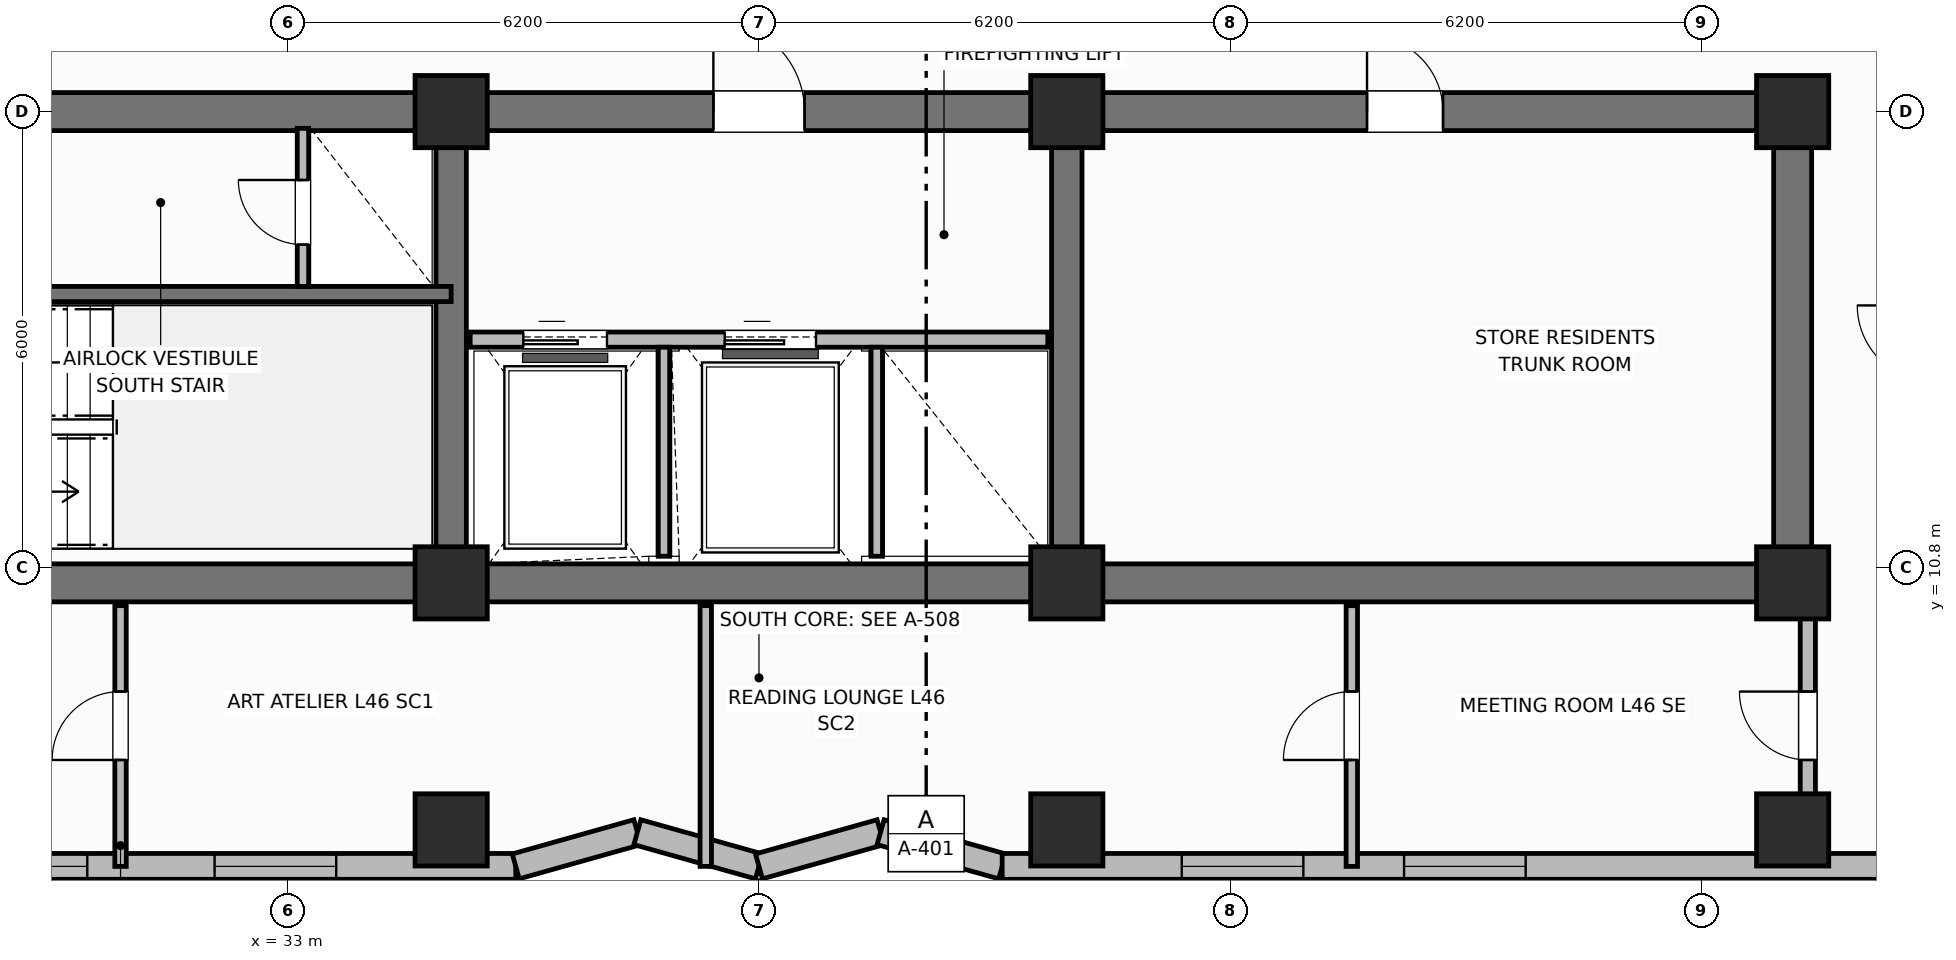
"""IFC4 building model, lengths in metres.
Left out: names, types, materials, properties, quantities, classifications, styles, units other than length and angle.
Written with IfcOpenShell. Run it as: python <this file> out.ifc"""

import sys

from ifc_helpers import new_model, si_unit, direction, frame, frame_2d, origin, origin_2d, place, context, subcontext, project, spatial, rectangle, extrude, element, fill, save


model = new_model("IFC4")
c1 = context("Model", 3, precision=1e-05, world=origin(), true_north=direction((0.0, 1.0)))
c2 = subcontext(c1, "Body", "Model", "MODEL_VIEW")
j1 = project(units=[si_unit("LENGTHUNIT", "METRE"), si_unit("PLANEANGLEUNIT", "RADIAN")], contexts=[c1])
p1 = place(None, origin())
s1 = spatial("IfcSite", under=j1, at=p1, CompositionType="ELEMENT")
p2 = place(p1, origin())
s2 = spatial("IfcBuilding", under=s1, at=p2, CompositionType="ELEMENT")
p3 = place(p2, frame((0.0, 0.0, 184.8)))
s3 = spatial("IfcBuildingStorey", under=s2, at=p3, CompositionType="ELEMENT", Elevation=184.8)
p4 = place(p3, frame((52.8, 10.6, 0.0), z_axis=(0.0, 0.0, 1.0), x_axis=(-1.0, 0.0, 0.0)))
e1 = element("IfcWall", 1, at=p4, inside=s3, PredefinedType="SHEAR", context=c2, shape_type="SweptSolid", body=[
    extrude(rectangle(XDim=27.2, YDim=0.5, at=frame_2d((13.6, 0.0))), origin(), (0.0, 0.0, 1.0), 3.7),
])
p5 = place(p3, frame((52.8, 10.85, 0.0), z_axis=(0.0, 0.0, 1.0), x_axis=(0.0, 1.0, 0.0)))
e2 = element("IfcWall", 2, at=p5, inside=s3, PredefinedType="SHEAR", context=c2, shape_type="SweptSolid", body=[
    extrude(rectangle(XDim=5.7, YDim=0.5, at=frame_2d((2.85, 0.0))), origin(), (0.0, 0.0, 1.0), 3.7),
])
p6 = place(p3, frame((25.6, 16.8, 0.0), z_axis=(0.0, 0.0, 1.0), x_axis=(1.0, 0.0, 0.0)))
e3 = element("IfcWall", 3, at=p6, inside=s3, PredefinedType="SHEAR", context=c2, shape_type="SweptSolid", body=[
    extrude(rectangle(XDim=27.2, YDim=0.5, at=frame_2d((13.6, 0.0))), origin(), (0.0, 0.0, 1.0), 3.7),
])
p7 = place(p6, frame((1.9, 0.0, 0.0)))
e4 = element("IfcOpeningElement", 4, at=p7, cuts=e3, PredefinedType="OPENING", context=c2, shape_type="SweptSolid", body=[
    extrude(rectangle(XDim=1.1, YDim=2.15, at=frame_2d((0.55, 1.075))), frame((0.0, 0.26, 0.0), z_axis=(0.0, -1.0, 0.0), x_axis=(1.0, 0.0, 0.0)), (0.0, 0.0, 1.0), 0.52),
])
p8 = place(p6, frame((13.0, 0.0, 0.0)))
e5 = element("IfcOpeningElement", 5, at=p8, cuts=e3, PredefinedType="OPENING", context=c2, shape_type="SweptSolid", body=[
    extrude(rectangle(XDim=1.2, YDim=2.15, at=frame_2d((0.6, 1.075))), frame((0.0, 0.26, 0.0), z_axis=(0.0, -1.0, 0.0), x_axis=(1.0, 0.0, 0.0)), (0.0, 0.0, 1.0), 0.52),
])
p9 = place(p6, frame((21.6, 0.0, 0.0)))
e6 = element("IfcOpeningElement", 6, at=p9, cuts=e3, PredefinedType="OPENING", context=c2, shape_type="SweptSolid", body=[
    extrude(rectangle(XDim=1.0, YDim=2.15, at=frame_2d((0.5, 1.075))), frame((0.0, 0.26, 0.0), z_axis=(0.0, -1.0, 0.0), x_axis=(1.0, 0.0, 0.0)), (0.0, 0.0, 1.0), 0.52),
])
for number, where, z_axis, x_axis in (
    (7, (35.15, 10.85, 0.0), (0.0, 0.0, 1.0), (0.0, 1.0, 0.0)),
    (8, (43.25, 10.85, 0.0), (0.0, 0.0, 1.0), (0.0, 1.0, 0.0)),
):
    element("IfcWall", number, at=place(p3, frame(where, z_axis=z_axis, x_axis=x_axis)), inside=s3, PredefinedType="SHEAR", context=c2, shape_type="SweptSolid", body=[
        extrude(rectangle(XDim=5.7, YDim=0.4, at=frame_2d((2.85, 0.0))), origin(), (0.0, 0.0, 1.0), 3.7),
    ])
for number, where, z_axis, x_axis in (
    (9, (35.15, 10.6, 0.0), (0.0, 0.0, 1.0), (1.0, 0.0, 0.0)),
    (10, (35.15, 16.8, 0.0), (0.0, 0.0, 1.0), (1.0, 0.0, 0.0)),
    (11, (43.25, 10.6, 0.0), (0.0, 0.0, 1.0), (1.0, 0.0, 0.0)),
    (12, (43.25, 16.8, 0.0), (0.0, 0.0, 1.0), (1.0, 0.0, 0.0)),
    (13, (52.8, 10.6, 0.0), (0.0, 0.0, 1.0), (1.0, 0.0, 0.0)),
    (14, (52.8, 16.8, 0.0), (0.0, 0.0, 1.0), (1.0, 0.0, 0.0)),
    (15, (35.15, 7.35, 0.0), (0.0, 0.0, 1.0), (1.0, 0.0, 0.0)),
    (16, (43.25, 7.35, 0.0), (0.0, 0.0, 1.0), (1.0, 0.0, 0.0)),
    (17, (52.8, 7.35, 0.0), (0.0, 0.0, 1.0), (1.0, 0.0, 0.0)),
):
    element("IfcColumn", number, at=place(p3, frame(where, z_axis=z_axis, x_axis=x_axis)), inside=s3, PredefinedType="COLUMN", context=c2, shape_type="SweptSolid", body=[
        extrude(rectangle(XDim=0.95, YDim=0.95, at=origin_2d()), origin(), (0.0, 0.0, 1.0), 3.7),
    ])
p10 = place(p3, frame((20.2, 6.87, 0.0), z_axis=(0.0, 0.0, 1.0), x_axis=(1.0, 0.0, 0.0)))
e18 = element("IfcWall", 18, at=p10, inside=s3, PredefinedType="SOLIDWALL", context=c2, shape_type="SweptSolid", body=[
    extrude(rectangle(XDim=15.8, YDim=0.34, at=frame_2d((7.9, 0.0))), origin(), (0.0, 0.0, 1.0), 2.72),
])
p11 = place(p10, frame((8.562, 0.0, 0.7)))
e19 = element("IfcOpeningElement", 19, at=p11, cuts=e18, PredefinedType="OPENING", context=c2, shape_type="SweptSolid", body=[
    extrude(rectangle(XDim=1.6, YDim=1.9, at=frame_2d((0.8, 0.95))), frame((0.0, 0.18, 0.0), z_axis=(0.0, -1.0, 0.0), x_axis=(1.0, 0.0, 0.0)), (0.0, 0.0, 1.0), 0.36),
])
p12 = place(p10, frame((11.837, 0.0, 0.7)))
e20 = element("IfcOpeningElement", 20, at=p12, cuts=e18, PredefinedType="OPENING", context=c2, shape_type="SweptSolid", body=[
    extrude(rectangle(XDim=1.6, YDim=1.9, at=frame_2d((0.8, 0.95))), frame((0.0, 0.18, 0.0), z_axis=(0.0, -1.0, 0.0), x_axis=(1.0, 0.0, 0.0)), (0.0, 0.0, 1.0), 0.36),
])
p13 = place(p3, frame((36.0, 6.87, 0.0), z_axis=(0.0, 0.0, 1.0), x_axis=(0.962662902433, 0.270703040766, 0.0)))
e21 = element("IfcWall", 21, at=p13, inside=s3, PredefinedType="SOLIDWALL", context=c2, shape_type="SweptSolid", body=[
    extrude(rectangle(XDim=1.662, YDim=0.34, at=frame_2d((0.831, 0.0))), origin(), (0.0, 0.0, 1.0), 2.72),
])
p14 = place(p3, frame((37.6, 7.32, 0.0), z_axis=(0.0, 0.0, 1.0), x_axis=(0.962652136636, -0.270741322725, 0.0)))
e22 = element("IfcWall", 22, at=p14, inside=s3, PredefinedType="SOLIDWALL", context=c2, shape_type="SweptSolid", body=[
    extrude(rectangle(XDim=1.662, YDim=0.34, at=frame_2d((0.831, 0.0))), origin(), (0.0, 0.0, 1.0), 2.72),
])
p15 = place(p3, frame((39.2, 6.87, 0.0), z_axis=(0.0, 0.0, 1.0), x_axis=(0.962662902433, 0.270703040766, 0.0)))
e23 = element("IfcWall", 23, at=p15, inside=s3, PredefinedType="SOLIDWALL", context=c2, shape_type="SweptSolid", body=[
    extrude(rectangle(XDim=1.662, YDim=0.34, at=frame_2d((0.831, 0.0))), origin(), (0.0, 0.0, 1.0), 2.72),
])
p16 = place(p3, frame((40.8, 7.32, 0.0), z_axis=(0.0, 0.0, 1.0), x_axis=(0.962652136636, -0.270741322725, 0.0)))
e24 = element("IfcWall", 24, at=p16, inside=s3, PredefinedType="SOLIDWALL", context=c2, shape_type="SweptSolid", body=[
    extrude(rectangle(XDim=1.662, YDim=0.34, at=frame_2d((0.831, 0.0))), origin(), (0.0, 0.0, 1.0), 2.72),
])
p17 = place(p3, frame((42.4, 6.87, 0.0), z_axis=(0.0, 0.0, 1.0), x_axis=(1.0, 0.0, 0.0)))
e25 = element("IfcWall", 25, at=p17, inside=s3, PredefinedType="SOLIDWALL", context=c2, shape_type="SweptSolid", body=[
    extrude(rectangle(XDim=15.8, YDim=0.34, at=frame_2d((7.9, 0.0))), origin(), (0.0, 0.0, 1.0), 2.72),
])
p18 = place(p17, frame((2.363, 0.0, 0.7)))
e26 = element("IfcOpeningElement", 26, at=p18, cuts=e25, PredefinedType="OPENING", context=c2, shape_type="SweptSolid", body=[
    extrude(rectangle(XDim=1.6, YDim=1.9, at=frame_2d((0.8, 0.95))), frame((0.0, 0.18, 0.0), z_axis=(0.0, -1.0, 0.0), x_axis=(1.0, 0.0, 0.0)), (0.0, 0.0, 1.0), 0.36),
])
p19 = place(p17, frame((5.288, 0.0, 0.7)))
e27 = element("IfcOpeningElement", 27, at=p19, cuts=e25, PredefinedType="OPENING", context=c2, shape_type="SweptSolid", body=[
    extrude(rectangle(XDim=1.6, YDim=1.9, at=frame_2d((0.8, 0.95))), frame((0.0, 0.18, 0.0), z_axis=(0.0, -1.0, 0.0), x_axis=(1.0, 0.0, 0.0)), (0.0, 0.0, 1.0), 0.36),
])
p20 = place(p17, frame((12.887, 0.0, 0.7)))
e28 = element("IfcOpeningElement", 28, at=p20, cuts=e25, PredefinedType="OPENING", context=c2, shape_type="SweptSolid", body=[
    extrude(rectangle(XDim=1.6, YDim=1.9, at=frame_2d((0.8, 0.95))), frame((0.0, 0.18, 0.0), z_axis=(0.0, -1.0, 0.0), x_axis=(1.0, 0.0, 0.0)), (0.0, 0.0, 1.0), 0.36),
])
p21 = place(p3, frame((25.6, 14.4, 0.0), z_axis=(0.0, 0.0, 1.0), x_axis=(1.0, 0.0, 0.0)))
e29 = element("IfcWall", 29, at=p21, inside=s3, PredefinedType="SHEAR", context=c2, shape_type="SweptSolid", body=[
    extrude(rectangle(XDim=9.55, YDim=0.2, at=frame_2d((4.775, 0.0))), origin(), (0.0, 0.0, 1.0), 3.7),
])
p22 = place(p21, frame((1.05, 0.0, 0.0)))
e30 = element("IfcOpeningElement", 30, at=p22, cuts=e29, PredefinedType="OPENING", context=c2, shape_type="SweptSolid", body=[
    extrude(rectangle(XDim=1.1, YDim=2.15, at=frame_2d((0.55, 1.075))), frame((0.0, 0.11, 0.0), z_axis=(0.0, -1.0, 0.0), x_axis=(1.0, 0.0, 0.0)), (0.0, 0.0, 1.0), 0.22),
])
p23 = place(p3, frame((33.2, 14.5, 0.0), z_axis=(0.0, 0.0, 1.0), x_axis=(0.0, 1.0, 0.0)))
e31 = element("IfcWall", 31, at=p23, inside=s3, PredefinedType="PARTITIONING", context=c2, shape_type="SweptSolid", body=[
    extrude(rectangle(XDim=2.08, YDim=0.15, at=frame_2d((1.04, 0.0))), origin(), (0.0, 0.0, 1.0), 2.55),
])
p24 = place(p23, frame((0.55, 0.0, 0.0)))
e32 = element("IfcOpeningElement", 32, at=p24, cuts=e31, PredefinedType="OPENING", context=c2, shape_type="SweptSolid", body=[
    extrude(rectangle(XDim=0.85, YDim=2.05, at=frame_2d((0.425, 1.025))), frame((0.0, 0.085, 0.0), z_axis=(0.0, -1.0, 0.0), x_axis=(1.0, 0.0, 0.0)), (0.0, 0.0, 1.0), 0.17),
])
p25 = place(p3, frame((35.4, 13.8, 0.0), z_axis=(0.0, 0.0, 1.0), x_axis=(1.0, 0.0, 0.0)))
e33 = element("IfcWall", 33, at=p25, inside=s3, PredefinedType="PARTITIONING", context=c2, shape_type="SweptSolid", body=[
    extrude(rectangle(XDim=7.6, YDim=0.2, at=frame_2d((3.8, 0.0))), origin(), (0.0, 0.0, 1.0), 2.32),
])
p26 = place(p25, frame((0.7, 0.0, 0.0)))
e34 = element("IfcOpeningElement", 34, at=p26, cuts=e33, PredefinedType="OPENING", context=c2, shape_type="SweptSolid", body=[
    extrude(rectangle(XDim=1.1, YDim=2.15, at=frame_2d((0.55, 1.075))), frame((0.0, 0.11, 0.0), z_axis=(0.0, -1.0, 0.0), x_axis=(1.0, 0.0, 0.0)), (0.0, 0.0, 1.0), 0.22),
])
p27 = place(p25, frame((3.35, 0.0, 0.0)))
e35 = element("IfcOpeningElement", 35, at=p27, cuts=e33, PredefinedType="OPENING", context=c2, shape_type="SweptSolid", body=[
    extrude(rectangle(XDim=1.2, YDim=2.15, at=frame_2d((0.6, 1.075))), frame((0.0, 0.11, 0.0), z_axis=(0.0, -1.0, 0.0), x_axis=(1.0, 0.0, 0.0)), (0.0, 0.0, 1.0), 0.22),
])
for number, where, z_axis, x_axis in (
    (36, (37.95, 10.95, 0.0), (0.0, 0.0, 1.0), (0.0, 1.0, 0.0)),
    (37, (40.75, 10.95, 0.0), (0.0, 0.0, 1.0), (0.0, 1.0, 0.0)),
):
    element("IfcWall", number, at=place(p3, frame(where, z_axis=z_axis, x_axis=x_axis)), inside=s3, PredefinedType="PARTITIONING", context=c2, shape_type="SweptSolid", body=[
        extrude(rectangle(XDim=2.75, YDim=0.15, at=frame_2d((1.375, 0.0))), origin(), (0.0, 0.0, 1.0), 2.55),
    ])
p28 = place(p3, frame((30.8, 6.87, 0.0), z_axis=(0.0, 0.0, 1.0), x_axis=(0.0, 1.0, 0.0)))
e38 = element("IfcWall", 38, at=p28, inside=s3, PredefinedType="PARTITIONING", context=c2, shape_type="SweptSolid", body=[
    extrude(rectangle(XDim=3.43, YDim=0.15, at=frame_2d((1.715, 0.0))), origin(), (0.0, 0.0, 1.0), 2.55),
])
p29 = place(p28, frame((1.4, 0.0, 0.0)))
e39 = element("IfcOpeningElement", 39, at=p29, cuts=e38, PredefinedType="OPENING", context=c2, shape_type="SweptSolid", body=[
    extrude(rectangle(XDim=0.9, YDim=2.1, at=frame_2d((0.45, 1.05))), frame((0.0, 0.085, 0.0), z_axis=(0.0, -1.0, 0.0), x_axis=(1.0, 0.0, 0.0)), (0.0, 0.0, 1.0), 0.17),
])
p30 = place(p3, frame((38.5, 6.87, 0.0), z_axis=(0.0, 0.0, 1.0), x_axis=(0.0, 1.0, 0.0)))
e40 = element("IfcWall", 40, at=p30, inside=s3, PredefinedType="PARTITIONING", context=c2, shape_type="SweptSolid", body=[
    extrude(rectangle(XDim=3.43, YDim=0.15, at=frame_2d((1.715, 0.0))), origin(), (0.0, 0.0, 1.0), 2.55),
])
p31 = place(p3, frame((47.0, 6.87, 0.0), z_axis=(0.0, 0.0, 1.0), x_axis=(0.0, 1.0, 0.0)))
e41 = element("IfcWall", 41, at=p31, inside=s3, PredefinedType="PARTITIONING", context=c2, shape_type="SweptSolid", body=[
    extrude(rectangle(XDim=3.43, YDim=0.15, at=frame_2d((1.715, 0.0))), origin(), (0.0, 0.0, 1.0), 2.55),
])
p32 = place(p31, frame((1.4, 0.0, 0.0)))
e42 = element("IfcOpeningElement", 42, at=p32, cuts=e41, PredefinedType="OPENING", context=c2, shape_type="SweptSolid", body=[
    extrude(rectangle(XDim=0.9, YDim=2.1, at=frame_2d((0.45, 1.05))), frame((0.0, 0.085, 0.0), z_axis=(0.0, -1.0, 0.0), x_axis=(1.0, 0.0, 0.0)), (0.0, 0.0, 1.0), 0.17),
])
p33 = place(p3, frame((53.0, 7.62, 0.0), z_axis=(0.0, 0.0, 1.0), x_axis=(0.0, 1.0, 0.0)))
e43 = element("IfcWall", 43, at=p33, inside=s3, PredefinedType="PARTITIONING", context=c2, shape_type="SweptSolid", body=[
    extrude(rectangle(XDim=2.68, YDim=0.2, at=frame_2d((1.34, 0.0))), origin(), (0.0, 0.0, 1.0), 2.55),
])
p34 = place(p33, frame((0.65, 0.0, 0.0)))
e44 = element("IfcOpeningElement", 44, at=p34, cuts=e43, PredefinedType="OPENING", context=c2, shape_type="SweptSolid", body=[
    extrude(rectangle(XDim=0.9, YDim=2.1, at=frame_2d((0.45, 1.05))), frame((0.0, 0.11, 0.0), z_axis=(0.0, -1.0, 0.0), x_axis=(1.0, 0.0, 0.0)), (0.0, 0.0, 1.0), 0.22),
])
p35 = place(p11, origin())
e45 = element("IfcWindow", 45, at=p35, inside=s3, PartitioningType="SINGLE_PANEL", PredefinedType="WINDOW", context=c2, shape_type="SweptSolid", body=[
    extrude(rectangle(XDim=1.6, YDim=1.9, at=frame_2d((0.8, 0.95))), frame((0.0, 0.03, 0.0), z_axis=(0.0, -1.0, 0.0), x_axis=(1.0, 0.0, 0.0)), (0.0, 0.0, 1.0), 0.06),
])
fill(e19, e45)
p36 = place(p12, origin())
e46 = element("IfcWindow", 46, at=p36, inside=s3, PartitioningType="SINGLE_PANEL", PredefinedType="WINDOW", context=c2, shape_type="SweptSolid", body=[
    extrude(rectangle(XDim=1.6, YDim=1.9, at=frame_2d((0.8, 0.95))), frame((0.0, 0.03, 0.0), z_axis=(0.0, -1.0, 0.0), x_axis=(1.0, 0.0, 0.0)), (0.0, 0.0, 1.0), 0.06),
])
fill(e20, e46)
p37 = place(p18, origin())
e47 = element("IfcWindow", 47, at=p37, inside=s3, PartitioningType="SINGLE_PANEL", PredefinedType="WINDOW", context=c2, shape_type="SweptSolid", body=[
    extrude(rectangle(XDim=1.6, YDim=1.9, at=frame_2d((0.8, 0.95))), frame((0.0, 0.03, 0.0), z_axis=(0.0, -1.0, 0.0), x_axis=(1.0, 0.0, 0.0)), (0.0, 0.0, 1.0), 0.06),
])
fill(e26, e47)
p38 = place(p19, origin())
e48 = element("IfcWindow", 48, at=p38, inside=s3, PartitioningType="SINGLE_PANEL", PredefinedType="WINDOW", context=c2, shape_type="SweptSolid", body=[
    extrude(rectangle(XDim=1.6, YDim=1.9, at=frame_2d((0.8, 0.95))), frame((0.0, 0.03, 0.0), z_axis=(0.0, -1.0, 0.0), x_axis=(1.0, 0.0, 0.0)), (0.0, 0.0, 1.0), 0.06),
])
fill(e27, e48)
p39 = place(p24, origin())
e49 = element("IfcDoor", 49, at=p39, inside=s3, OperationType="SINGLE_SWING_RIGHT", PredefinedType="TRAPDOOR", context=c2, shape_type="SweptSolid", body=[
    extrude(rectangle(XDim=0.85, YDim=2.05, at=frame_2d((0.425, 1.025))), frame((0.0, 0.025, 0.0), z_axis=(0.0, -1.0, 0.0), x_axis=(1.0, 0.0, 0.0)), (0.0, 0.0, 1.0), 0.05),
])
fill(e32, e49)
p40 = place(p26, origin())
e50 = element("IfcDoor", 50, at=p40, inside=s3, OperationType="SLIDING_TO_LEFT", PredefinedType="DOOR", context=c2, shape_type="SweptSolid", body=[
    extrude(rectangle(XDim=1.1, YDim=2.15, at=frame_2d((0.55, 1.075))), frame((0.0, 0.025, 0.0), z_axis=(0.0, -1.0, 0.0), x_axis=(1.0, 0.0, 0.0)), (0.0, 0.0, 1.0), 0.05),
])
fill(e34, e50)
p41 = place(p27, origin())
e51 = element("IfcDoor", 51, at=p41, inside=s3, OperationType="SLIDING_TO_LEFT", PredefinedType="DOOR", context=c2, shape_type="SweptSolid", body=[
    extrude(rectangle(XDim=1.2, YDim=2.15, at=frame_2d((0.6, 1.075))), frame((0.0, 0.025, 0.0), z_axis=(0.0, -1.0, 0.0), x_axis=(1.0, 0.0, 0.0)), (0.0, 0.0, 1.0), 0.05),
])
fill(e35, e51)
p42 = place(p29, origin())
e52 = element("IfcDoor", 52, at=p42, inside=s3, OperationType="SINGLE_SWING_LEFT", PredefinedType="DOOR", context=c2, shape_type="SweptSolid", body=[
    extrude(rectangle(XDim=0.9, YDim=2.1, at=frame_2d((0.45, 1.05))), frame((0.0, 0.025, 0.0), z_axis=(0.0, -1.0, 0.0), x_axis=(1.0, 0.0, 0.0)), (0.0, 0.0, 1.0), 0.05),
])
fill(e39, e52)
p43 = place(p32, origin())
e53 = element("IfcDoor", 53, at=p43, inside=s3, OperationType="SINGLE_SWING_LEFT", PredefinedType="DOOR", context=c2, shape_type="SweptSolid", body=[
    extrude(rectangle(XDim=0.9, YDim=2.1, at=frame_2d((0.45, 1.05))), frame((0.0, 0.025, 0.0), z_axis=(0.0, -1.0, 0.0), x_axis=(1.0, 0.0, 0.0)), (0.0, 0.0, 1.0), 0.05),
])
fill(e42, e53)
p44 = place(p34, origin())
e54 = element("IfcDoor", 54, at=p44, inside=s3, OperationType="SINGLE_SWING_RIGHT", PredefinedType="DOOR", context=c2, shape_type="SweptSolid", body=[
    extrude(rectangle(XDim=0.9, YDim=2.1, at=frame_2d((0.45, 1.05))), frame((0.0, 0.025, 0.0), z_axis=(0.0, -1.0, 0.0), x_axis=(1.0, 0.0, 0.0)), (0.0, 0.0, 1.0), 0.05),
])
fill(e44, e54)
p45 = place(p8, origin())
e55 = element("IfcDoor", 55, at=p45, inside=s3, OperationType="SINGLE_SWING_LEFT", PredefinedType="DOOR", context=c2, shape_type="SweptSolid", body=[
    extrude(rectangle(XDim=1.2, YDim=2.15, at=frame_2d((0.6, 1.075))), frame((0.0, 0.025, 0.0), z_axis=(0.0, -1.0, 0.0), x_axis=(1.0, 0.0, 0.0)), (0.0, 0.0, 1.0), 0.05),
])
fill(e5, e55)
p46 = place(p9, origin())
e56 = element("IfcDoor", 56, at=p46, inside=s3, OperationType="SINGLE_SWING_LEFT", PredefinedType="DOOR", context=c2, shape_type="SweptSolid", body=[
    extrude(rectangle(XDim=1.0, YDim=2.15, at=frame_2d((0.5, 1.075))), frame((0.0, 0.025, 0.0), z_axis=(0.0, -1.0, 0.0), x_axis=(1.0, 0.0, 0.0)), (0.0, 0.0, 1.0), 0.05),
])
fill(e6, e56)
save(model, sys.argv[1])
